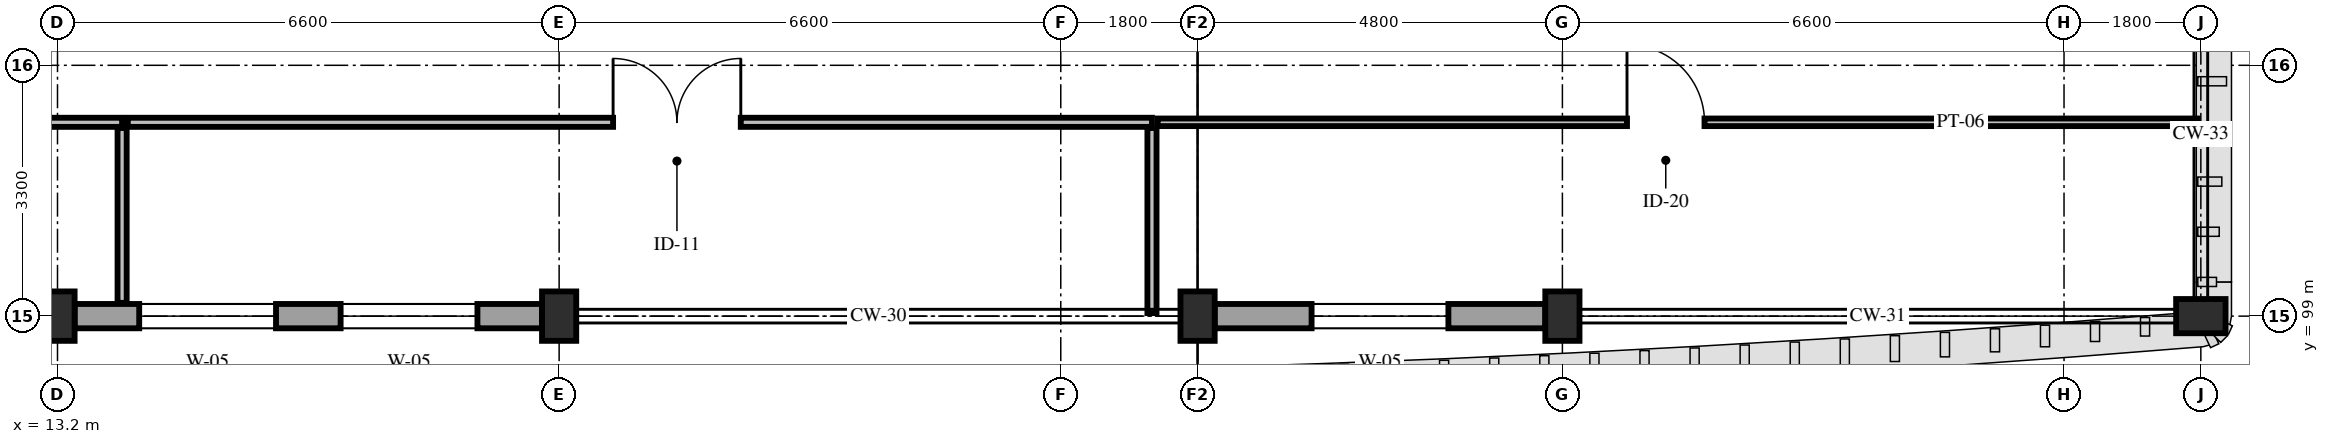
"""IFC4 building model, lengths in metres.
Left out: names, types, materials, properties, quantities, classifications, styles, units other than length and angle.
Written with IfcOpenShell. Run it as: python <this file> out.ifc"""

import sys

from ifc_helpers import new_model, si_unit, direction, frame, frame_2d, origin, origin_2d, place, context, subcontext, project, spatial, rectangle, extrude, element, fill, save


model = new_model("IFC4")
c1 = context("Model", 3, precision=1e-05, world=origin(), true_north=direction((0.0, 1.0)))
c2 = subcontext(c1, "Body", "Model", "MODEL_VIEW")
j1 = project(units=[si_unit("LENGTHUNIT", "METRE"), si_unit("PLANEANGLEUNIT", "RADIAN")], contexts=[c1])
p1 = place(None, origin())
s1 = spatial("IfcSite", under=j1, at=p1, CompositionType="ELEMENT")
p2 = place(p1, origin())
s2 = spatial("IfcBuilding", under=s1, at=p2, CompositionType="ELEMENT")
p3 = place(p2, frame((0.0, 0.0, 29.4)))
s3 = spatial("IfcBuildingStorey", under=s2, at=p3, CompositionType="ELEMENT", Elevation=29.4)
for number, where, z_axis, x_axis in (
    (1, (13.2, 99.0, 0.0), (0.0, 0.0, 1.0), (1.0, 0.0, 0.0)),
    (2, (19.8, 99.0, 0.0), (0.0, 0.0, 1.0), (1.0, 0.0, 0.0)),
    (3, (28.2, 99.0, 0.0), (0.0, 0.0, 1.0), (1.0, 0.0, 0.0)),
    (4, (33.0, 99.0, 0.0), (0.0, 0.0, 1.0), (1.0, 0.0, 0.0)),
    (5, (41.4, 99.0, 0.0), (0.0, 0.0, 1.0), (0.0, 1.0, 0.0)),
):
    element("IfcColumn", number, at=place(p3, frame(where, z_axis=z_axis, x_axis=x_axis)), inside=s3, PredefinedType="PILASTER", context=c2, shape_type="SweptSolid", body=[
        extrude(rectangle(XDim=0.45, YDim=0.65, at=origin_2d()), origin(), (0.0, 0.0, 1.0), 4.8),
    ])
p4 = place(p3, frame((32.775, 99.0, 0.0), z_axis=(0.0, 0.0, 1.0), x_axis=(-1.0, 0.0, 0.0)))
e6 = element("IfcWall", 6, at=p4, inside=s3, PredefinedType="STANDARD", context=c2, shape_type="SweptSolid", body=[
    extrude(rectangle(XDim=4.35, YDim=0.32, at=frame_2d((2.175, 0.0))), origin(), (0.0, 0.0, 1.0), 3.95),
])
p5 = place(p4, frame((1.275, 0.0, 0.85)))
e7 = element("IfcOpeningElement", 7, at=p5, cuts=e6, PredefinedType="OPENING", context=c2, shape_type="SweptSolid", body=[
    extrude(rectangle(XDim=1.8, YDim=1.5, at=frame_2d((0.9, 0.75))), frame((0.0, 0.175, 0.0), z_axis=(0.0, -1.0, 0.0), x_axis=(1.0, 0.0, 0.0)), (0.0, 0.0, 1.0), 0.35),
])
p6 = place(p3, frame((19.575, 99.0, 0.0), z_axis=(0.0, 0.0, 1.0), x_axis=(-1.0, 0.0, 0.0)))
e8 = element("IfcWall", 8, at=p6, inside=s3, PredefinedType="STANDARD", context=c2, shape_type="SweptSolid", body=[
    extrude(rectangle(XDim=6.15, YDim=0.32, at=frame_2d((3.075, 0.0))), origin(), (0.0, 0.0, 1.0), 3.93),
])
p7 = place(p6, frame((0.85, 0.0, 0.85)))
e9 = element("IfcOpeningElement", 9, at=p7, cuts=e8, PredefinedType="OPENING", context=c2, shape_type="SweptSolid", body=[
    extrude(rectangle(XDim=1.8, YDim=1.5, at=frame_2d((0.9, 0.75))), frame((0.0, 0.175, 0.0), z_axis=(0.0, -1.0, 0.0), x_axis=(1.0, 0.0, 0.0)), (0.0, 0.0, 1.0), 0.35),
])
p8 = place(p6, frame((3.5, 0.0, 0.85)))
e10 = element("IfcOpeningElement", 10, at=p8, cuts=e8, PredefinedType="OPENING", context=c2, shape_type="SweptSolid", body=[
    extrude(rectangle(XDim=1.8, YDim=1.5, at=frame_2d((0.9, 0.75))), frame((0.0, 0.175, 0.0), z_axis=(0.0, -1.0, 0.0), x_axis=(1.0, 0.0, 0.0)), (0.0, 0.0, 1.0), 0.35),
])
p9 = place(p3, frame((4.865, 101.55, 0.0), z_axis=(0.0, 0.0, 1.0), x_axis=(1.0, 0.0, 0.0)))
e11 = element("IfcWall", 11, at=p9, inside=s3, PredefinedType="PARTITIONING", context=c2, shape_type="SweptSolid", body=[
    extrude(rectangle(XDim=9.185, YDim=0.12, at=frame_2d((4.593, 0.0))), origin(), (0.0, 0.0, 1.0), 4.08),
])
p10 = place(p9, frame((3.935, 0.0, 0.0)))
e12 = element("IfcOpeningElement", 12, at=p10, cuts=e11, PredefinedType="OPENING", context=c2, shape_type="SweptSolid", body=[
    extrude(rectangle(XDim=1.26, YDim=2.2, at=frame_2d((0.63, 1.1))), frame((0.0, 0.075, 0.0), z_axis=(0.0, -1.0, 0.0), x_axis=(1.0, 0.0, 0.0)), (0.0, 0.0, 1.0), 0.15),
])
p11 = place(p3, frame((14.05, 99.175, 0.0), z_axis=(0.0, 0.0, 1.0), x_axis=(0.0, 1.0, 0.0)))
e13 = element("IfcWall", 13, at=p11, inside=s3, PredefinedType="PARTITIONING", context=c2, shape_type="SweptSolid", body=[
    extrude(rectangle(XDim=2.3, YDim=0.12, at=frame_2d((1.15, 0.0))), origin(), (0.0, 0.0, 1.0), 3.93),
])
p12 = place(p3, frame((14.125, 101.55, 0.0), z_axis=(0.0, 0.0, 1.0), x_axis=(1.0, 0.0, 0.0)))
e14 = element("IfcWall", 14, at=p12, inside=s3, PredefinedType="PARTITIONING", context=c2, shape_type="SweptSolid", body=[
    extrude(rectangle(XDim=13.475, YDim=0.12, at=frame_2d((6.738, 0.0))), origin(), (0.0, 0.0, 1.0), 4.13),
])
p13 = place(p12, frame((6.385, 0.0, 0.0)))
e15 = element("IfcOpeningElement", 15, at=p13, cuts=e14, PredefinedType="OPENING", context=c2, shape_type="SweptSolid", body=[
    extrude(rectangle(XDim=1.68, YDim=2.3, at=frame_2d((0.84, 1.15))), frame((0.0, 0.075, 0.0), z_axis=(0.0, -1.0, 0.0), x_axis=(1.0, 0.0, 0.0)), (0.0, 0.0, 1.0), 0.15),
])
p14 = place(p3, frame((27.6, 99.04, 0.0), z_axis=(0.0, 0.0, 1.0), x_axis=(0.0, 1.0, 0.0)))
e16 = element("IfcWall", 16, at=p14, inside=s3, PredefinedType="PARTITIONING", context=c2, shape_type="SweptSolid", body=[
    extrude(rectangle(XDim=2.435, YDim=0.12, at=frame_2d((1.218, 0.0))), origin(), (0.0, 0.0, 1.0), 3.93),
])
p15 = place(p3, frame((27.675, 101.55, 0.0), z_axis=(0.0, 0.0, 1.0), x_axis=(1.0, 0.0, 0.0)))
e17 = element("IfcWall", 17, at=p15, inside=s3, PredefinedType="PARTITIONING", context=c2, shape_type="SweptSolid", body=[
    extrude(rectangle(XDim=13.685, YDim=0.1, at=frame_2d((6.843, 0.0))), origin(), (0.0, 0.0, 1.0), 4.08),
])
p16 = place(p15, frame((6.175, 0.0, 0.0)))
e18 = element("IfcOpeningElement", 18, at=p16, cuts=e17, PredefinedType="OPENING", context=c2, shape_type="SweptSolid", body=[
    extrude(rectangle(XDim=1.02, YDim=2.2, at=frame_2d((0.51, 1.1))), frame((0.0, 0.065, 0.0), z_axis=(0.0, -1.0, 0.0), x_axis=(1.0, 0.0, 0.0)), (0.0, 0.0, 1.0), 0.13),
])
p17 = place(p5, origin())
e19 = element("IfcWindow", 19, at=p17, inside=s3, PartitioningType="DOUBLE_PANEL_VERTICAL", PredefinedType="WINDOW", context=c2, shape_type="SweptSolid", body=[
    extrude(rectangle(XDim=1.8, YDim=1.5, at=frame_2d((0.9, 0.75))), frame((0.0, 0.03, 0.0), z_axis=(0.0, -1.0, 0.0), x_axis=(1.0, 0.0, 0.0)), (0.0, 0.0, 1.0), 0.06),
])
fill(e7, e19)
p18 = place(p7, origin())
e20 = element("IfcWindow", 20, at=p18, inside=s3, PartitioningType="DOUBLE_PANEL_VERTICAL", PredefinedType="WINDOW", context=c2, shape_type="SweptSolid", body=[
    extrude(rectangle(XDim=1.8, YDim=1.5, at=frame_2d((0.9, 0.75))), frame((0.0, 0.03, 0.0), z_axis=(0.0, -1.0, 0.0), x_axis=(1.0, 0.0, 0.0)), (0.0, 0.0, 1.0), 0.06),
])
fill(e9, e20)
p19 = place(p8, origin())
e21 = element("IfcWindow", 21, at=p19, inside=s3, PartitioningType="DOUBLE_PANEL_VERTICAL", PredefinedType="WINDOW", context=c2, shape_type="SweptSolid", body=[
    extrude(rectangle(XDim=1.8, YDim=1.5, at=frame_2d((0.9, 0.75))), frame((0.0, 0.03, 0.0), z_axis=(0.0, -1.0, 0.0), x_axis=(1.0, 0.0, 0.0)), (0.0, 0.0, 1.0), 0.06),
])
fill(e10, e21)
p20 = place(p13, origin())
e22 = element("IfcDoor", 22, at=p20, inside=s3, OperationType="DOUBLE_DOOR_SINGLE_SWING", PredefinedType="DOOR", context=c2, shape_type="SweptSolid", body=[
    extrude(rectangle(XDim=1.68, YDim=2.3, at=frame_2d((0.84, 1.15))), frame((0.0, 0.025, 0.0), z_axis=(0.0, -1.0, 0.0), x_axis=(1.0, 0.0, 0.0)), (0.0, 0.0, 1.0), 0.05),
])
fill(e15, e22)
p21 = place(p16, origin())
e23 = element("IfcDoor", 23, at=p21, inside=s3, OperationType="SINGLE_SWING_LEFT", PredefinedType="DOOR", context=c2, shape_type="SweptSolid", body=[
    extrude(rectangle(XDim=1.02, YDim=2.2, at=frame_2d((0.51, 1.1))), frame((0.0, 0.025, 0.0), z_axis=(0.0, -1.0, 0.0), x_axis=(1.0, 0.0, 0.0)), (0.0, 0.0, 1.0), 0.05),
])
fill(e18, e23)
save(model, sys.argv[1])
